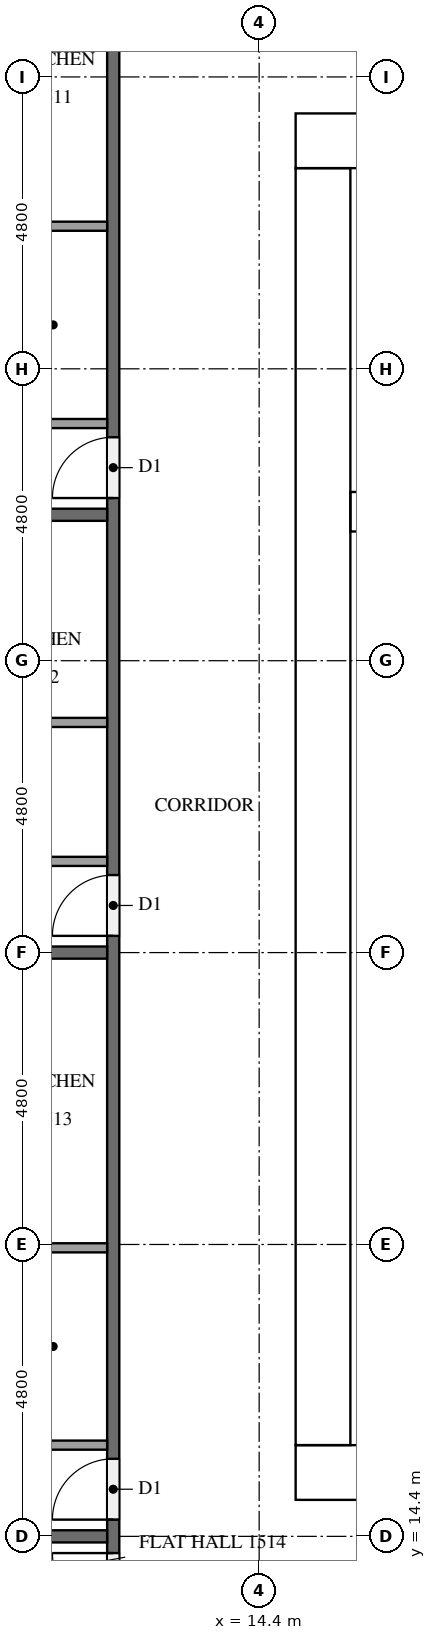
"""IFC4 building model, lengths in metres.
Left out: names, types, materials, properties, quantities, classifications, styles, units other than length and angle.
Written with IfcOpenShell. Run it as: python <this file> out.ifc"""

import sys

from ifc_helpers import new_model, si_unit, direction, frame, frame_2d, origin, place, context, subcontext, project, spatial, rectangle, extrude, element, fill, save


model = new_model("IFC4")
c1 = context("Model", 3, precision=1e-05, world=origin(), true_north=direction((0.0, 1.0)))
c2 = subcontext(c1, "Body", "Model", "MODEL_VIEW")
j1 = project(units=[si_unit("LENGTHUNIT", "METRE"), si_unit("PLANEANGLEUNIT", "RADIAN")], contexts=[c1])
p1 = place(None, origin())
s1 = spatial("IfcSite", under=j1, at=p1, CompositionType="ELEMENT")
p2 = place(p1, origin())
s2 = spatial("IfcBuilding", under=s1, at=p2, CompositionType="ELEMENT")
p3 = place(p2, frame((0.0, 0.0, 62.8)))
s3 = spatial("IfcBuildingStorey", under=s2, at=p3, CompositionType="ELEMENT", Elevation=62.8)
p4 = place(p3, frame((15.0, 15.45, 0.0), z_axis=(0.0, 0.0, 1.0), x_axis=(1.0, 0.0, 0.0)))
e1 = element("IfcWall", 1, at=p4, inside=s3, PredefinedType="SHEAR", context=c2, shape_type="SweptSolid", body=[
    extrude(rectangle(XDim=32.4, YDim=0.9, at=frame_2d((16.2, 0.0))), origin(), (0.0, 0.0, 1.0), 3.2),
])
p5 = place(p4, frame((15.3, 0.0, 0.0)))
e2 = element("IfcOpeningElement", 2, at=p5, cuts=e1, PredefinedType="OPENING", context=c2, shape_type="SweptSolid", body=[
    extrude(rectangle(XDim=1.8, YDim=2.1, at=frame_2d((0.9, 1.05))), frame((0.0, 0.46, 0.0), z_axis=(0.0, -1.0, 0.0), x_axis=(1.0, 0.0, 0.0)), (0.0, 0.0, 1.0), 0.92),
])
p6 = place(p3, frame((15.0, 37.35, 0.0), z_axis=(0.0, 0.0, 1.0), x_axis=(1.0, 0.0, 0.0)))
e3 = element("IfcWall", 3, at=p6, inside=s3, PredefinedType="SHEAR", context=c2, shape_type="SweptSolid", body=[
    extrude(rectangle(XDim=32.4, YDim=0.9, at=frame_2d((16.2, 0.0))), origin(), (0.0, 0.0, 1.0), 3.2),
])
p7 = place(p6, frame((15.3, 0.0, 0.0)))
e4 = element("IfcOpeningElement", 4, at=p7, cuts=e3, PredefinedType="OPENING", context=c2, shape_type="SweptSolid", body=[
    extrude(rectangle(XDim=1.8, YDim=2.1, at=frame_2d((0.9, 1.05))), frame((0.0, 0.46, 0.0), z_axis=(0.0, -1.0, 0.0), x_axis=(1.0, 0.0, 0.0)), (0.0, 0.0, 1.0), 0.92),
])
p8 = place(p6, frame((1.794, 0.0, 0.0)))
e5 = element("IfcOpeningElement", 5, at=p8, cuts=e3, PredefinedType="OPENING", context=c2, shape_type="SweptSolid", body=[
    extrude(rectangle(XDim=1.0, YDim=2.1, at=frame_2d((0.5, 1.05))), frame((0.0, 0.46, 0.0), z_axis=(0.0, -1.0, 0.0), x_axis=(1.0, 0.0, 0.0)), (0.0, 0.0, 1.0), 0.92),
])
p9 = place(p6, frame((5.331, 0.0, 0.0)))
e6 = element("IfcOpeningElement", 6, at=p9, cuts=e3, PredefinedType="OPENING", context=c2, shape_type="SweptSolid", body=[
    extrude(rectangle(XDim=1.0, YDim=2.1, at=frame_2d((0.5, 1.05))), frame((0.0, 0.46, 0.0), z_axis=(0.0, -1.0, 0.0), x_axis=(1.0, 0.0, 0.0)), (0.0, 0.0, 1.0), 0.92),
])
p10 = place(p3, frame((15.45, 15.9, 0.0), z_axis=(0.0, 0.0, 1.0), x_axis=(0.0, 1.0, 0.0)))
e7 = element("IfcWall", 7, at=p10, inside=s3, PredefinedType="SHEAR", context=c2, shape_type="SweptSolid", body=[
    extrude(rectangle(XDim=21.0, YDim=0.9, at=frame_2d((10.5, 0.0))), origin(), (0.0, 0.0, 1.0), 3.2),
])
p11 = place(p10, frame((4.86, 0.0, 0.0)))
e8 = element("IfcOpeningElement", 8, at=p11, cuts=e7, PredefinedType="OPENING", context=c2, shape_type="SweptSolid", body=[
    extrude(rectangle(XDim=1.2, YDim=2.1, at=frame_2d((0.6, 1.05))), frame((0.0, 0.46, 0.0), z_axis=(0.0, -1.0, 0.0), x_axis=(1.0, 0.0, 0.0)), (0.0, 0.0, 1.0), 0.92),
])
p12 = place(p3, frame((15.9, 31.25, 0.0), z_axis=(0.0, 0.0, 1.0), x_axis=(1.0, 0.0, 0.0)))
e9 = element("IfcWall", 9, at=p12, inside=s3, PredefinedType="SHEAR", context=c2, shape_type="SweptSolid", body=[
    extrude(rectangle(XDim=6.875, YDim=0.65, at=frame_2d((3.438, 0.0))), origin(), (0.0, 0.0, 1.0), 3.2),
])
p13 = place(p3, frame((12.0, 12.1, 0.0), z_axis=(0.0, 0.0, 1.0), x_axis=(0.0, 1.0, 0.0)))
e10 = element("IfcWall", 10, at=p13, inside=s3, PredefinedType="PARTITIONING", context=c2, shape_type="SweptSolid", body=[
    extrude(rectangle(XDim=28.6, YDim=0.2, at=frame_2d((14.3, 0.0))), origin(), (0.0, 0.0, 1.0), 3.2),
])
p14 = place(p13, frame((19.375, 0.0, 0.0)))
e11 = element("IfcOpeningElement", 11, at=p14, cuts=e10, PredefinedType="OPENING", context=c2, shape_type="SweptSolid", body=[
    extrude(rectangle(XDim=1.0, YDim=2.1, at=frame_2d((0.5, 1.05))), frame((0.0, 0.11, 0.0), z_axis=(0.0, -1.0, 0.0), x_axis=(1.0, 0.0, 0.0)), (0.0, 0.0, 1.0), 0.22),
])
p15 = place(p13, frame((12.175, 0.0, 0.0)))
e12 = element("IfcOpeningElement", 12, at=p15, cuts=e10, PredefinedType="OPENING", context=c2, shape_type="SweptSolid", body=[
    extrude(rectangle(XDim=1.0, YDim=2.1, at=frame_2d((0.5, 1.05))), frame((0.0, 0.11, 0.0), z_axis=(0.0, -1.0, 0.0), x_axis=(1.0, 0.0, 0.0)), (0.0, 0.0, 1.0), 0.22),
])
p16 = place(p13, frame((2.575, 0.0, 0.0)))
e13 = element("IfcOpeningElement", 13, at=p16, cuts=e10, PredefinedType="OPENING", context=c2, shape_type="SweptSolid", body=[
    extrude(rectangle(XDim=1.0, YDim=2.1, at=frame_2d((0.5, 1.05))), frame((0.0, 0.11, 0.0), z_axis=(0.0, -1.0, 0.0), x_axis=(1.0, 0.0, 0.0)), (0.0, 0.0, 1.0), 0.22),
])
p17 = place(p13, frame((1.025, 0.0, 0.0)))
e14 = element("IfcOpeningElement", 14, at=p17, cuts=e10, PredefinedType="OPENING", context=c2, shape_type="SweptSolid", body=[
    extrude(rectangle(XDim=1.0, YDim=2.1, at=frame_2d((0.5, 1.05))), frame((0.0, 0.11, 0.0), z_axis=(0.0, -1.0, 0.0), x_axis=(1.0, 0.0, 0.0)), (0.0, 0.0, 1.0), 0.22),
])
p18 = place(p3, frame((4.9, 31.2, 0.0), z_axis=(0.0, 0.0, 1.0), x_axis=(1.0, 0.0, 0.0)))
e15 = element("IfcWall", 15, at=p18, inside=s3, PredefinedType="PARTITIONING", context=c2, shape_type="SweptSolid", body=[
    extrude(rectangle(XDim=7.0, YDim=0.2, at=frame_2d((3.5, 0.0))), origin(), (0.0, 0.0, 1.0), 3.2),
])
for number, where, z_axis, x_axis in (
    (16, (5.225, 24.0, 0.0), (0.0, 0.0, 1.0), (1.0, 0.0, 0.0)),
    (17, (5.225, 14.4, 0.0), (0.0, 0.0, 1.0), (1.0, 0.0, 0.0)),
):
    element("IfcWall", number, at=place(p3, frame(where, z_axis=z_axis, x_axis=x_axis)), inside=s3, PredefinedType="PARTITIONING", context=c2, shape_type="SweptSolid", body=[
        extrude(rectangle(XDim=6.675, YDim=0.2, at=frame_2d((3.337, 0.0))), origin(), (0.0, 0.0, 1.0), 3.2),
    ])
p19 = place(p3, frame((11.9, 35.945, 0.0), z_axis=(0.0, 0.0, 1.0), x_axis=(-1.0, 0.0, 0.0)))
e18 = element("IfcWall", 18, at=p19, inside=s3, PredefinedType="PARTITIONING", context=c2, shape_type="SweptSolid", body=[
    extrude(rectangle(XDim=1.775, YDim=0.15, at=frame_2d((0.887, 0.0))), origin(), (0.0, 0.0, 1.0), 3.2),
])
p20 = place(p3, frame((11.9, 32.7, 0.0), z_axis=(0.0, 0.0, 1.0), x_axis=(-1.0, 0.0, 0.0)))
e19 = element("IfcWall", 19, at=p20, inside=s3, PredefinedType="PARTITIONING", context=c2, shape_type="SweptSolid", body=[
    extrude(rectangle(XDim=1.925, YDim=0.15, at=frame_2d((0.962, 0.0))), origin(), (0.0, 0.0, 1.0), 3.2),
])
p21 = place(p3, frame((11.9, 27.785, 0.0), z_axis=(0.0, 0.0, 1.0), x_axis=(-1.0, 0.0, 0.0)))
e20 = element("IfcWall", 20, at=p21, inside=s3, PredefinedType="PARTITIONING", context=c2, shape_type="SweptSolid", body=[
    extrude(rectangle(XDim=2.075, YDim=0.15, at=frame_2d((1.038, 0.0))), origin(), (0.0, 0.0, 1.0), 3.2),
])
p22 = place(p3, frame((11.9, 25.5, 0.0), z_axis=(0.0, 0.0, 1.0), x_axis=(-1.0, 0.0, 0.0)))
e21 = element("IfcWall", 21, at=p22, inside=s3, PredefinedType="PARTITIONING", context=c2, shape_type="SweptSolid", body=[
    extrude(rectangle(XDim=2.225, YDim=0.15, at=frame_2d((1.112, 0.0))), origin(), (0.0, 0.0, 1.0), 3.2),
])
p23 = place(p3, frame((11.9, 19.145, 0.0), z_axis=(0.0, 0.0, 1.0), x_axis=(-1.0, 0.0, 0.0)))
e22 = element("IfcWall", 22, at=p23, inside=s3, PredefinedType="PARTITIONING", context=c2, shape_type="SweptSolid", body=[
    extrude(rectangle(XDim=1.775, YDim=0.15, at=frame_2d((0.887, 0.0))), origin(), (0.0, 0.0, 1.0), 3.2),
])
p24 = place(p3, frame((11.9, 15.9, 0.0), z_axis=(0.0, 0.0, 1.0), x_axis=(-1.0, 0.0, 0.0)))
e23 = element("IfcWall", 23, at=p24, inside=s3, PredefinedType="PARTITIONING", context=c2, shape_type="SweptSolid", body=[
    extrude(rectangle(XDim=1.925, YDim=0.15, at=frame_2d((0.962, 0.0))), origin(), (0.0, 0.0, 1.0), 3.2),
])
p25 = place(p11, frame((1.2, 0.0, 0.0), z_axis=(0.0, 0.0, 1.0), x_axis=(-1.0, 0.0, 0.0)))
e24 = element("IfcDoor", 24, at=p25, inside=s3, OperationType="SINGLE_SWING_RIGHT", PredefinedType="DOOR", context=c2, shape_type="SweptSolid", body=[
    extrude(rectangle(XDim=1.2, YDim=2.1, at=frame_2d((0.6, 1.05))), frame((0.0, 0.025, 0.0), z_axis=(0.0, -1.0, 0.0), x_axis=(1.0, 0.0, 0.0)), (0.0, 0.0, 1.0), 0.05),
])
fill(e8, e24)
p26 = place(p14, origin())
e25 = element("IfcDoor", 25, at=p26, inside=s3, OperationType="SINGLE_SWING_LEFT", PredefinedType="DOOR", context=c2, shape_type="SweptSolid", body=[
    extrude(rectangle(XDim=1.0, YDim=2.1, at=frame_2d((0.5, 1.05))), frame((0.0, 0.025, 0.0), z_axis=(0.0, -1.0, 0.0), x_axis=(1.0, 0.0, 0.0)), (0.0, 0.0, 1.0), 0.05),
])
fill(e11, e25)
p27 = place(p15, origin())
e26 = element("IfcDoor", 26, at=p27, inside=s3, OperationType="SINGLE_SWING_LEFT", PredefinedType="DOOR", context=c2, shape_type="SweptSolid", body=[
    extrude(rectangle(XDim=1.0, YDim=2.1, at=frame_2d((0.5, 1.05))), frame((0.0, 0.025, 0.0), z_axis=(0.0, -1.0, 0.0), x_axis=(1.0, 0.0, 0.0)), (0.0, 0.0, 1.0), 0.05),
])
fill(e12, e26)
p28 = place(p16, origin())
e27 = element("IfcDoor", 27, at=p28, inside=s3, OperationType="SINGLE_SWING_LEFT", PredefinedType="DOOR", context=c2, shape_type="SweptSolid", body=[
    extrude(rectangle(XDim=1.0, YDim=2.1, at=frame_2d((0.5, 1.05))), frame((0.0, 0.025, 0.0), z_axis=(0.0, -1.0, 0.0), x_axis=(1.0, 0.0, 0.0)), (0.0, 0.0, 1.0), 0.05),
])
fill(e13, e27)
p29 = place(p17, origin())
e28 = element("IfcDoor", 28, at=p29, inside=s3, OperationType="SINGLE_SWING_RIGHT", PredefinedType="DOOR", context=c2, shape_type="SweptSolid", body=[
    extrude(rectangle(XDim=1.0, YDim=2.1, at=frame_2d((0.5, 1.05))), frame((0.0, 0.025, 0.0), z_axis=(0.0, -1.0, 0.0), x_axis=(1.0, 0.0, 0.0)), (0.0, 0.0, 1.0), 0.05),
])
fill(e14, e28)
save(model, sys.argv[1])
